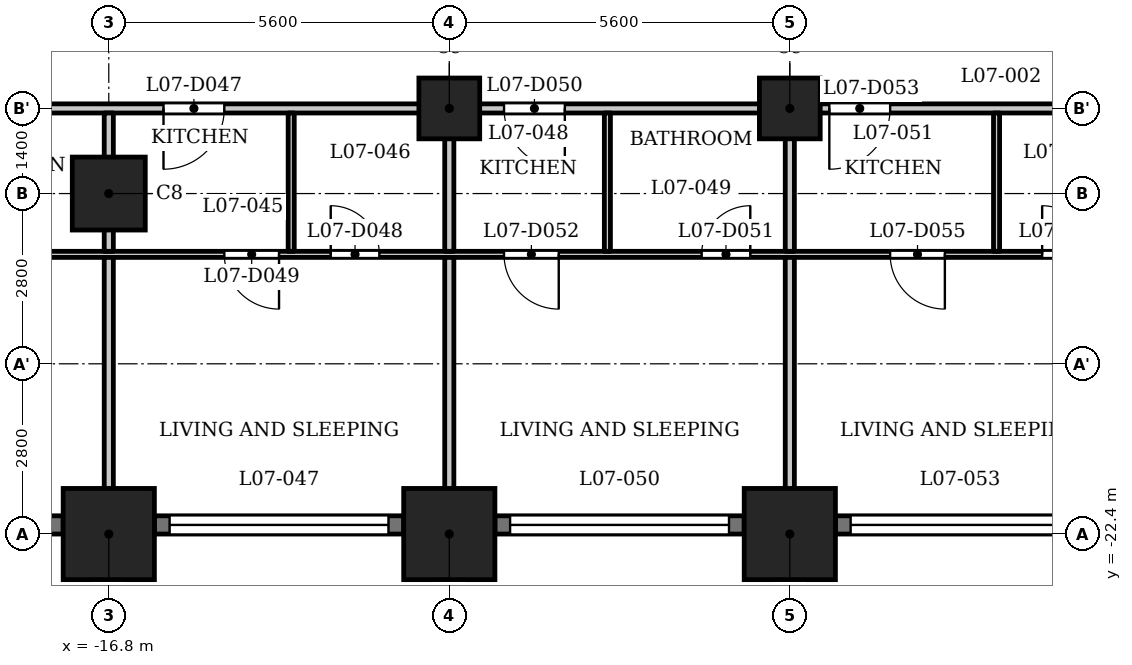
"""IFC4 building model, lengths in metres.
Left out: names, types, materials, properties, quantities, classifications, styles, units other than length and angle.
Written with IfcOpenShell. Run it as: python <this file> out.ifc"""

import sys

from ifc_helpers import new_model, si_unit, direction, frame, frame_2d, origin, origin_2d, place, context, subcontext, project, spatial, rectangle, extrude, element, fill, save


model = new_model("IFC4")
c1 = context("Model", 3, precision=1e-05, world=origin(), true_north=direction((0.0, 1.0)))
c2 = subcontext(c1, "Body", "Model", "MODEL_VIEW")
j1 = project(units=[si_unit("LENGTHUNIT", "METRE"), si_unit("PLANEANGLEUNIT", "RADIAN")], contexts=[c1])
p1 = place(None, origin())
s1 = spatial("IfcSite", under=j1, at=p1, CompositionType="ELEMENT")
p2 = place(p1, origin())
s2 = spatial("IfcBuilding", under=s1, at=p2, CompositionType="ELEMENT")
p3 = place(p2, frame((0.0, 0.0, 34.0)))
s3 = spatial("IfcBuildingStorey", under=s2, at=p3, CompositionType="ELEMENT", Elevation=34.0)
for number, where, z_axis, x_axis in (
    (1, (-16.8, -22.4, 0.0), (0.0, 0.0, 1.0), (1.0, 0.0, 0.0)),
    (2, (-11.2, -22.4, 0.0), (0.0, 0.0, 1.0), (1.0, 0.0, 0.0)),
    (3, (-5.6, -22.4, 0.0), (0.0, 0.0, 1.0), (1.0, 0.0, 0.0)),
):
    element("IfcColumn", number, at=place(p3, frame(where, z_axis=z_axis, x_axis=x_axis)), inside=s3, PredefinedType="COLUMN", context=c2, shape_type="SweptSolid", body=[
        extrude(rectangle(XDim=1.5, YDim=1.5, at=origin_2d()), origin(), (0.0, 0.0, 1.0), 3.5),
    ])
p4 = place(p3, frame((-16.8, -16.8, 0.0), z_axis=(0.0, 0.0, 1.0), x_axis=(1.0, 0.0, 0.0)))
e4 = element("IfcColumn", 4, at=p4, inside=s3, PredefinedType="COLUMN", context=c2, shape_type="SweptSolid", body=[
    extrude(rectangle(XDim=1.2, YDim=1.2, at=origin_2d()), origin(), (0.0, 0.0, 1.0), 3.5),
])
for number, where, z_axis, x_axis in (
    (5, (-11.2, -15.4, 0.0), (0.0, 0.0, 1.0), (1.0, 0.0, 0.0)),
    (6, (-5.6, -15.4, 0.0), (0.0, 0.0, 1.0), (1.0, 0.0, 0.0)),
):
    element("IfcColumn", number, at=place(p3, frame(where, z_axis=z_axis, x_axis=x_axis)), inside=s3, PredefinedType="COLUMN", context=c2, shape_type="SweptSolid", body=[
        extrude(rectangle(XDim=1.0, YDim=1.0, at=origin_2d()), origin(), (0.0, 0.0, 1.0), 3.5),
    ])
p5 = place(p3, frame((-20.0, -22.25, 0.0), z_axis=(0.0, 0.0, 1.0), x_axis=(1.0, 0.0, 0.0)))
e7 = element("IfcWall", 7, at=p5, inside=s3, PredefinedType="SOLIDWALL", context=c2, shape_type="SweptSolid", body=[
    extrude(rectangle(XDim=2.45, YDim=0.3, at=frame_2d((1.225, 0.0))), origin(), (0.0, 0.0, 1.0), 2.35),
])
p6 = place(p5, frame((0.625, 0.0, 0.6)))
e8 = element("IfcOpeningElement", 8, at=p6, cuts=e7, PredefinedType="OPENING", context=c2, shape_type="SweptSolid", body=[
    extrude(rectangle(XDim=1.2, YDim=1.55, at=frame_2d((0.6, 0.775))), frame((0.0, 0.16, 0.0), z_axis=(0.0, -1.0, 0.0), x_axis=(1.0, 0.0, 0.0)), (0.0, 0.0, 1.0), 0.32),
])
p7 = place(p3, frame((-16.05, -22.25, 0.0), z_axis=(0.0, 0.0, 1.0), x_axis=(1.0, 0.0, 0.0)))
e9 = element("IfcWall", 9, at=p7, inside=s3, PredefinedType="SOLIDWALL", context=c2, shape_type="SweptSolid", body=[
    extrude(rectangle(XDim=4.1, YDim=0.3, at=frame_2d((2.05, 0.0))), origin(), (0.0, 0.0, 1.0), 2.35),
])
p8 = place(p7, frame((0.25, 0.0, 1.2)))
e10 = element("IfcOpeningElement", 10, at=p8, cuts=e9, PredefinedType="OPENING", context=c2, shape_type="SweptSolid", body=[
    extrude(rectangle(XDim=3.6, YDim=0.95, at=frame_2d((1.8, 0.475))), frame((0.0, 0.16, 0.0), z_axis=(0.0, -1.0, 0.0), x_axis=(1.0, 0.0, 0.0)), (0.0, 0.0, 1.0), 0.32),
])
p9 = place(p3, frame((-10.45, -22.25, 0.0), z_axis=(0.0, 0.0, 1.0), x_axis=(1.0, 0.0, 0.0)))
e11 = element("IfcWall", 11, at=p9, inside=s3, PredefinedType="SOLIDWALL", context=c2, shape_type="SweptSolid", body=[
    extrude(rectangle(XDim=4.1, YDim=0.3, at=frame_2d((2.05, 0.0))), origin(), (0.0, 0.0, 1.0), 2.35),
])
p10 = place(p9, frame((0.25, 0.0, 1.2)))
e12 = element("IfcOpeningElement", 12, at=p10, cuts=e11, PredefinedType="OPENING", context=c2, shape_type="SweptSolid", body=[
    extrude(rectangle(XDim=3.6, YDim=0.95, at=frame_2d((1.8, 0.475))), frame((0.0, 0.16, 0.0), z_axis=(0.0, -1.0, 0.0), x_axis=(1.0, 0.0, 0.0)), (0.0, 0.0, 1.0), 0.32),
])
p11 = place(p3, frame((-4.85, -22.25, 0.0), z_axis=(0.0, 0.0, 1.0), x_axis=(1.0, 0.0, 0.0)))
e13 = element("IfcWall", 13, at=p11, inside=s3, PredefinedType="SOLIDWALL", context=c2, shape_type="SweptSolid", body=[
    extrude(rectangle(XDim=4.1, YDim=0.3, at=frame_2d((2.05, 0.0))), origin(), (0.0, 0.0, 1.0), 2.35),
])
p12 = place(p11, frame((0.25, 0.0, 1.2)))
e14 = element("IfcOpeningElement", 14, at=p12, cuts=e13, PredefinedType="OPENING", context=c2, shape_type="SweptSolid", body=[
    extrude(rectangle(XDim=3.6, YDim=0.95, at=frame_2d((1.8, 0.475))), frame((0.0, 0.16, 0.0), z_axis=(0.0, -1.0, 0.0), x_axis=(1.0, 0.0, 0.0)), (0.0, 0.0, 1.0), 0.32),
])
p13 = place(p3, frame((-26.394, -17.8, 0.0), z_axis=(0.0, 0.0, 1.0), x_axis=(1.0, 0.0, 0.0)))
e15 = element("IfcWall", 15, at=p13, inside=s3, PredefinedType="PARTITIONING", context=c2, shape_type="SweptSolid", body=[
    extrude(rectangle(XDim=53.126, YDim=0.1, at=frame_2d((26.563, 0.0))), origin(), (0.0, 0.0, 1.0), 3.2),
])
p14 = place(p13, frame((0.794, 0.0, 0.0)))
e16 = element("IfcOpeningElement", 16, at=p14, cuts=e15, PredefinedType="OPENING", context=c2, shape_type="SweptSolid", body=[
    extrude(rectangle(XDim=0.8, YDim=2.1, at=frame_2d((0.4, 1.05))), frame((0.0, 0.06, 0.0), z_axis=(0.0, -1.0, 0.0), x_axis=(1.0, 0.0, 0.0)), (0.0, 0.0, 1.0), 0.12),
])
p15 = place(p13, frame((5.644, 0.0, 0.0)))
e17 = element("IfcOpeningElement", 17, at=p15, cuts=e15, PredefinedType="OPENING", context=c2, shape_type="SweptSolid", body=[
    extrude(rectangle(XDim=0.9, YDim=2.1, at=frame_2d((0.45, 1.05))), frame((0.0, 0.06, 0.0), z_axis=(0.0, -1.0, 0.0), x_axis=(1.0, 0.0, 0.0)), (0.0, 0.0, 1.0), 0.12),
])
p16 = place(p13, frame((13.244, 0.0, 0.0)))
e18 = element("IfcOpeningElement", 18, at=p16, cuts=e15, PredefinedType="OPENING", context=c2, shape_type="SweptSolid", body=[
    extrude(rectangle(XDim=0.8, YDim=2.1, at=frame_2d((0.4, 1.05))), frame((0.0, 0.06, 0.0), z_axis=(0.0, -1.0, 0.0), x_axis=(1.0, 0.0, 0.0)), (0.0, 0.0, 1.0), 0.12),
])
p17 = place(p13, frame((11.494, 0.0, 0.0)))
e19 = element("IfcOpeningElement", 19, at=p17, cuts=e15, PredefinedType="OPENING", context=c2, shape_type="SweptSolid", body=[
    extrude(rectangle(XDim=0.9, YDim=2.1, at=frame_2d((0.45, 1.05))), frame((0.0, 0.06, 0.0), z_axis=(0.0, -1.0, 0.0), x_axis=(1.0, 0.0, 0.0)), (0.0, 0.0, 1.0), 0.12),
])
p18 = place(p13, frame((19.344, 0.0, 0.0)))
e20 = element("IfcOpeningElement", 20, at=p18, cuts=e15, PredefinedType="OPENING", context=c2, shape_type="SweptSolid", body=[
    extrude(rectangle(XDim=0.8, YDim=2.1, at=frame_2d((0.4, 1.05))), frame((0.0, 0.06, 0.0), z_axis=(0.0, -1.0, 0.0), x_axis=(1.0, 0.0, 0.0)), (0.0, 0.0, 1.0), 0.12),
])
p19 = place(p13, frame((16.094, 0.0, 0.0)))
e21 = element("IfcOpeningElement", 21, at=p19, cuts=e15, PredefinedType="OPENING", context=c2, shape_type="SweptSolid", body=[
    extrude(rectangle(XDim=0.9, YDim=2.1, at=frame_2d((0.45, 1.05))), frame((0.0, 0.06, 0.0), z_axis=(0.0, -1.0, 0.0), x_axis=(1.0, 0.0, 0.0)), (0.0, 0.0, 1.0), 0.12),
])
p20 = place(p13, frame((24.944, 0.0, 0.0)))
e22 = element("IfcOpeningElement", 22, at=p20, cuts=e15, PredefinedType="OPENING", context=c2, shape_type="SweptSolid", body=[
    extrude(rectangle(XDim=0.8, YDim=2.1, at=frame_2d((0.4, 1.05))), frame((0.0, 0.06, 0.0), z_axis=(0.0, -1.0, 0.0), x_axis=(1.0, 0.0, 0.0)), (0.0, 0.0, 1.0), 0.12),
])
p21 = place(p13, frame((22.444, 0.0, 0.0)))
e23 = element("IfcOpeningElement", 23, at=p21, cuts=e15, PredefinedType="OPENING", context=c2, shape_type="SweptSolid", body=[
    extrude(rectangle(XDim=0.9, YDim=2.1, at=frame_2d((0.45, 1.05))), frame((0.0, 0.06, 0.0), z_axis=(0.0, -1.0, 0.0), x_axis=(1.0, 0.0, 0.0)), (0.0, 0.0, 1.0), 0.12),
])
p22 = place(p13, frame((30.294, 0.0, 0.0)))
e24 = element("IfcOpeningElement", 24, at=p22, cuts=e15, PredefinedType="OPENING", context=c2, shape_type="SweptSolid", body=[
    extrude(rectangle(XDim=0.8, YDim=2.1, at=frame_2d((0.4, 1.05))), frame((0.0, 0.06, 0.0), z_axis=(0.0, -1.0, 0.0), x_axis=(1.0, 0.0, 0.0)), (0.0, 0.0, 1.0), 0.12),
])
p23 = place(p13, frame((26.794, 0.0, 0.0)))
e25 = element("IfcOpeningElement", 25, at=p23, cuts=e15, PredefinedType="OPENING", context=c2, shape_type="SweptSolid", body=[
    extrude(rectangle(XDim=0.9, YDim=2.1, at=frame_2d((0.45, 1.05))), frame((0.0, 0.06, 0.0), z_axis=(0.0, -1.0, 0.0), x_axis=(1.0, 0.0, 0.0)), (0.0, 0.0, 1.0), 0.12),
])
p24 = place(p13, frame((32.744, 0.0, 0.0)))
e26 = element("IfcOpeningElement", 26, at=p24, cuts=e15, PredefinedType="OPENING", context=c2, shape_type="SweptSolid", body=[
    extrude(rectangle(XDim=0.8, YDim=2.1, at=frame_2d((0.4, 1.05))), frame((0.0, 0.06, 0.0), z_axis=(0.0, -1.0, 0.0), x_axis=(1.0, 0.0, 0.0)), (0.0, 0.0, 1.0), 0.12),
])
p25 = place(p13, frame((35.594, 0.0, 0.0)))
e27 = element("IfcOpeningElement", 27, at=p25, cuts=e15, PredefinedType="OPENING", context=c2, shape_type="SweptSolid", body=[
    extrude(rectangle(XDim=0.9, YDim=2.1, at=frame_2d((0.45, 1.05))), frame((0.0, 0.06, 0.0), z_axis=(0.0, -1.0, 0.0), x_axis=(1.0, 0.0, 0.0)), (0.0, 0.0, 1.0), 0.12),
])
p26 = place(p13, frame((39.244, 0.0, 0.0)))
e28 = element("IfcOpeningElement", 28, at=p26, cuts=e15, PredefinedType="OPENING", context=c2, shape_type="SweptSolid", body=[
    extrude(rectangle(XDim=0.9, YDim=2.1, at=frame_2d((0.45, 1.05))), frame((0.0, 0.06, 0.0), z_axis=(0.0, -1.0, 0.0), x_axis=(1.0, 0.0, 0.0)), (0.0, 0.0, 1.0), 0.12),
])
p27 = place(p13, frame((41.544, 0.0, 0.0)))
e29 = element("IfcOpeningElement", 29, at=p27, cuts=e15, PredefinedType="OPENING", context=c2, shape_type="SweptSolid", body=[
    extrude(rectangle(XDim=0.9, YDim=2.1, at=frame_2d((0.45, 1.05))), frame((0.0, 0.06, 0.0), z_axis=(0.0, -1.0, 0.0), x_axis=(1.0, 0.0, 0.0)), (0.0, 0.0, 1.0), 0.12),
])
p28 = place(p13, frame((49.362, 0.0, 0.0)))
e30 = element("IfcOpeningElement", 30, at=p28, cuts=e15, PredefinedType="OPENING", context=c2, shape_type="SweptSolid", body=[
    extrude(rectangle(XDim=0.8, YDim=2.1, at=frame_2d((0.4, 1.05))), frame((0.0, 0.06, 0.0), z_axis=(0.0, -1.0, 0.0), x_axis=(1.0, 0.0, 0.0)), (0.0, 0.0, 1.0), 0.12),
])
p29 = place(p13, frame((45.094, 0.0, 0.0)))
e31 = element("IfcOpeningElement", 31, at=p29, cuts=e15, PredefinedType="OPENING", context=c2, shape_type="SweptSolid", body=[
    extrude(rectangle(XDim=0.9, YDim=2.1, at=frame_2d((0.45, 1.05))), frame((0.0, 0.06, 0.0), z_axis=(0.0, -1.0, 0.0), x_axis=(1.0, 0.0, 0.0)), (0.0, 0.0, 1.0), 0.12),
])
p30 = place(p3, frame((-27.484, -15.4, 0.0), z_axis=(0.0, 0.0, 1.0), x_axis=(1.0, 0.0, 0.0)))
e32 = element("IfcWall", 32, at=p30, inside=s3, PredefinedType="PARTITIONING", context=c2, shape_type="SweptSolid", body=[
    extrude(rectangle(XDim=54.968, YDim=0.15, at=frame_2d((27.484, 0.0))), origin(), (0.0, 0.0, 1.0), 3.2),
])
p31 = place(p30, frame((5.734, 0.0, 0.0)))
e33 = element("IfcOpeningElement", 33, at=p31, cuts=e32, PredefinedType="OPENING", context=c2, shape_type="SweptSolid", body=[
    extrude(rectangle(XDim=1.0, YDim=2.1, at=frame_2d((0.5, 1.05))), frame((0.0, 0.085, 0.0), z_axis=(0.0, -1.0, 0.0), x_axis=(1.0, 0.0, 0.0)), (0.0, 0.0, 1.0), 0.17),
])
p32 = place(p30, frame((11.584, 0.0, 0.0)))
e34 = element("IfcOpeningElement", 34, at=p32, cuts=e32, PredefinedType="OPENING", context=c2, shape_type="SweptSolid", body=[
    extrude(rectangle(XDim=1.0, YDim=2.1, at=frame_2d((0.5, 1.05))), frame((0.0, 0.085, 0.0), z_axis=(0.0, -1.0, 0.0), x_axis=(1.0, 0.0, 0.0)), (0.0, 0.0, 1.0), 0.17),
])
p33 = place(p30, frame((17.184, 0.0, 0.0)))
e35 = element("IfcOpeningElement", 35, at=p33, cuts=e32, PredefinedType="OPENING", context=c2, shape_type="SweptSolid", body=[
    extrude(rectangle(XDim=1.0, YDim=2.1, at=frame_2d((0.5, 1.05))), frame((0.0, 0.085, 0.0), z_axis=(0.0, -1.0, 0.0), x_axis=(1.0, 0.0, 0.0)), (0.0, 0.0, 1.0), 0.17),
])
p34 = place(p30, frame((22.534, 0.0, 0.0)))
e36 = element("IfcOpeningElement", 36, at=p34, cuts=e32, PredefinedType="OPENING", context=c2, shape_type="SweptSolid", body=[
    extrude(rectangle(XDim=1.0, YDim=2.1, at=frame_2d((0.5, 1.05))), frame((0.0, 0.085, 0.0), z_axis=(0.0, -1.0, 0.0), x_axis=(1.0, 0.0, 0.0)), (0.0, 0.0, 1.0), 0.17),
])
p35 = place(p30, frame((28.884, 0.0, 0.0)))
e37 = element("IfcOpeningElement", 37, at=p35, cuts=e32, PredefinedType="OPENING", context=c2, shape_type="SweptSolid", body=[
    extrude(rectangle(XDim=1.0, YDim=2.1, at=frame_2d((0.5, 1.05))), frame((0.0, 0.085, 0.0), z_axis=(0.0, -1.0, 0.0), x_axis=(1.0, 0.0, 0.0)), (0.0, 0.0, 1.0), 0.17),
])
p36 = place(p30, frame((39.334, 0.0, 0.0)))
e38 = element("IfcOpeningElement", 38, at=p36, cuts=e32, PredefinedType="OPENING", context=c2, shape_type="SweptSolid", body=[
    extrude(rectangle(XDim=1.0, YDim=2.1, at=frame_2d((0.5, 1.05))), frame((0.0, 0.085, 0.0), z_axis=(0.0, -1.0, 0.0), x_axis=(1.0, 0.0, 0.0)), (0.0, 0.0, 1.0), 0.17),
])
p37 = place(p30, frame((45.184, 0.0, 0.0)))
e39 = element("IfcOpeningElement", 39, at=p37, cuts=e32, PredefinedType="OPENING", context=c2, shape_type="SweptSolid", body=[
    extrude(rectangle(XDim=1.0, YDim=2.1, at=frame_2d((0.5, 1.05))), frame((0.0, 0.085, 0.0), z_axis=(0.0, -1.0, 0.0), x_axis=(1.0, 0.0, 0.0)), (0.0, 0.0, 1.0), 0.17),
])
p38 = place(p3, frame((-16.8, -23.13, 0.0), z_axis=(0.0, 0.0, 1.0), x_axis=(0.0, 1.0, 0.0)))
e40 = element("IfcWall", 40, at=p38, inside=s3, PredefinedType="PARTITIONING", context=c2, shape_type="SweptSolid", body=[
    extrude(rectangle(XDim=5.28, YDim=0.15, at=frame_2d((2.64, 0.0))), origin(), (0.0, 0.0, 1.0), 3.2),
])
p39 = place(p3, frame((-16.8, -17.75, 0.0), z_axis=(0.0, 0.0, 1.0), x_axis=(0.0, 1.0, 0.0)))
e41 = element("IfcWall", 41, at=p39, inside=s3, PredefinedType="PARTITIONING", context=c2, shape_type="SweptSolid", body=[
    extrude(rectangle(XDim=2.275, YDim=0.15, at=frame_2d((1.137, 0.0))), origin(), (0.0, 0.0, 1.0), 3.2),
])
p40 = place(p3, frame((-13.8, -17.75, 0.0), z_axis=(0.0, 0.0, 1.0), x_axis=(0.0, 1.0, 0.0)))
e42 = element("IfcWall", 42, at=p40, inside=s3, PredefinedType="PARTITIONING", context=c2, shape_type="SweptSolid", body=[
    extrude(rectangle(XDim=2.275, YDim=0.1, at=frame_2d((1.137, 0.0))), origin(), (0.0, 0.0, 1.0), 3.2),
])
p41 = place(p3, frame((-11.2, -23.13, 0.0), z_axis=(0.0, 0.0, 1.0), x_axis=(0.0, 1.0, 0.0)))
e43 = element("IfcWall", 43, at=p41, inside=s3, PredefinedType="PARTITIONING", context=c2, shape_type="SweptSolid", body=[
    extrude(rectangle(XDim=5.28, YDim=0.15, at=frame_2d((2.64, 0.0))), origin(), (0.0, 0.0, 1.0), 3.2),
])
p42 = place(p3, frame((-11.2, -17.75, 0.0), z_axis=(0.0, 0.0, 1.0), x_axis=(0.0, 1.0, 0.0)))
e44 = element("IfcWall", 44, at=p42, inside=s3, PredefinedType="PARTITIONING", context=c2, shape_type="SweptSolid", body=[
    extrude(rectangle(XDim=2.275, YDim=0.15, at=frame_2d((1.137, 0.0))), origin(), (0.0, 0.0, 1.0), 3.2),
])
p43 = place(p3, frame((-8.6, -17.75, 0.0), z_axis=(0.0, 0.0, 1.0), x_axis=(0.0, 1.0, 0.0)))
e45 = element("IfcWall", 45, at=p43, inside=s3, PredefinedType="PARTITIONING", context=c2, shape_type="SweptSolid", body=[
    extrude(rectangle(XDim=2.275, YDim=0.1, at=frame_2d((1.137, 0.0))), origin(), (0.0, 0.0, 1.0), 3.2),
])
p44 = place(p3, frame((-5.6, -23.13, 0.0), z_axis=(0.0, 0.0, 1.0), x_axis=(0.0, 1.0, 0.0)))
e46 = element("IfcWall", 46, at=p44, inside=s3, PredefinedType="PARTITIONING", context=c2, shape_type="SweptSolid", body=[
    extrude(rectangle(XDim=5.28, YDim=0.15, at=frame_2d((2.64, 0.0))), origin(), (0.0, 0.0, 1.0), 3.2),
])
p45 = place(p3, frame((-5.6, -17.75, 0.0), z_axis=(0.0, 0.0, 1.0), x_axis=(0.0, 1.0, 0.0)))
e47 = element("IfcWall", 47, at=p45, inside=s3, PredefinedType="PARTITIONING", context=c2, shape_type="SweptSolid", body=[
    extrude(rectangle(XDim=2.275, YDim=0.15, at=frame_2d((1.137, 0.0))), origin(), (0.0, 0.0, 1.0), 3.2),
])
p46 = place(p3, frame((-2.2, -17.75, 0.0), z_axis=(0.0, 0.0, 1.0), x_axis=(0.0, 1.0, 0.0)))
e48 = element("IfcWall", 48, at=p46, inside=s3, PredefinedType="PARTITIONING", context=c2, shape_type="SweptSolid", body=[
    extrude(rectangle(XDim=2.275, YDim=0.1, at=frame_2d((1.137, 0.0))), origin(), (0.0, 0.0, 1.0), 3.2),
])
p47 = place(p32, origin())
e49 = element("IfcDoor", 49, at=p47, inside=s3, OperationType="SINGLE_SWING_LEFT", PredefinedType="DOOR", context=c2, shape_type="SweptSolid", body=[
    extrude(rectangle(XDim=1.0, YDim=2.1, at=frame_2d((0.5, 1.05))), frame((0.0, 0.025, 0.0), z_axis=(0.0, -1.0, 0.0), x_axis=(1.0, 0.0, 0.0)), (0.0, 0.0, 1.0), 0.05),
])
fill(e34, e49)
p48 = place(p16, origin())
e50 = element("IfcDoor", 50, at=p48, inside=s3, OperationType="SINGLE_SWING_RIGHT", PredefinedType="DOOR", context=c2, shape_type="SweptSolid", body=[
    extrude(rectangle(XDim=0.8, YDim=2.1, at=frame_2d((0.4, 1.05))), frame((0.0, 0.025, 0.0), z_axis=(0.0, -1.0, 0.0), x_axis=(1.0, 0.0, 0.0)), (0.0, 0.0, 1.0), 0.05),
])
fill(e18, e50)
p49 = place(p17, origin())
e51 = element("IfcDoor", 51, at=p49, inside=s3, OperationType="SINGLE_SWING_RIGHT", PredefinedType="DOOR", context=c2, shape_type="SweptSolid", body=[
    extrude(rectangle(XDim=0.9, YDim=2.1, at=frame_2d((0.45, 1.05))), frame((0.0, 0.025, 0.0), z_axis=(0.0, -1.0, 0.0), x_axis=(1.0, 0.0, 0.0)), (0.0, 0.0, 1.0), 0.05),
])
fill(e19, e51)
p50 = place(p33, origin())
e52 = element("IfcDoor", 52, at=p50, inside=s3, OperationType="SINGLE_SWING_RIGHT", PredefinedType="DOOR", context=c2, shape_type="SweptSolid", body=[
    extrude(rectangle(XDim=1.0, YDim=2.1, at=frame_2d((0.5, 1.05))), frame((0.0, 0.025, 0.0), z_axis=(0.0, -1.0, 0.0), x_axis=(1.0, 0.0, 0.0)), (0.0, 0.0, 1.0), 0.05),
])
fill(e35, e52)
p51 = place(p18, origin())
e53 = element("IfcDoor", 53, at=p51, inside=s3, OperationType="SINGLE_SWING_LEFT", PredefinedType="DOOR", context=c2, shape_type="SweptSolid", body=[
    extrude(rectangle(XDim=0.8, YDim=2.1, at=frame_2d((0.4, 1.05))), frame((0.0, 0.025, 0.0), z_axis=(0.0, -1.0, 0.0), x_axis=(1.0, 0.0, 0.0)), (0.0, 0.0, 1.0), 0.05),
])
fill(e20, e53)
p52 = place(p19, origin())
e54 = element("IfcDoor", 54, at=p52, inside=s3, OperationType="SINGLE_SWING_RIGHT", PredefinedType="DOOR", context=c2, shape_type="SweptSolid", body=[
    extrude(rectangle(XDim=0.9, YDim=2.1, at=frame_2d((0.45, 1.05))), frame((0.0, 0.025, 0.0), z_axis=(0.0, -1.0, 0.0), x_axis=(1.0, 0.0, 0.0)), (0.0, 0.0, 1.0), 0.05),
])
fill(e21, e54)
p53 = place(p34, origin())
e55 = element("IfcDoor", 55, at=p53, inside=s3, OperationType="SINGLE_SWING_LEFT", PredefinedType="DOOR", context=c2, shape_type="SweptSolid", body=[
    extrude(rectangle(XDim=1.0, YDim=2.1, at=frame_2d((0.5, 1.05))), frame((0.0, 0.025, 0.0), z_axis=(0.0, -1.0, 0.0), x_axis=(1.0, 0.0, 0.0)), (0.0, 0.0, 1.0), 0.05),
])
fill(e36, e55)
p54 = place(p20, origin())
e56 = element("IfcDoor", 56, at=p54, inside=s3, OperationType="SINGLE_SWING_RIGHT", PredefinedType="DOOR", context=c2, shape_type="SweptSolid", body=[
    extrude(rectangle(XDim=0.8, YDim=2.1, at=frame_2d((0.4, 1.05))), frame((0.0, 0.025, 0.0), z_axis=(0.0, -1.0, 0.0), x_axis=(1.0, 0.0, 0.0)), (0.0, 0.0, 1.0), 0.05),
])
fill(e22, e56)
p55 = place(p21, origin())
e57 = element("IfcDoor", 57, at=p55, inside=s3, OperationType="SINGLE_SWING_RIGHT", PredefinedType="DOOR", context=c2, shape_type="SweptSolid", body=[
    extrude(rectangle(XDim=0.9, YDim=2.1, at=frame_2d((0.45, 1.05))), frame((0.0, 0.025, 0.0), z_axis=(0.0, -1.0, 0.0), x_axis=(1.0, 0.0, 0.0)), (0.0, 0.0, 1.0), 0.05),
])
fill(e23, e57)
p56 = place(p8, origin())
e58 = element("IfcWindow", 58, at=p56, inside=s3, PartitioningType="SINGLE_PANEL", PredefinedType="WINDOW", context=c2, shape_type="SweptSolid", body=[
    extrude(rectangle(XDim=3.6, YDim=0.95, at=frame_2d((1.8, 0.475))), frame((0.0, 0.03, 0.0), z_axis=(0.0, -1.0, 0.0), x_axis=(1.0, 0.0, 0.0)), (0.0, 0.0, 1.0), 0.06),
])
fill(e10, e58)
p57 = place(p10, origin())
e59 = element("IfcWindow", 59, at=p57, inside=s3, PartitioningType="SINGLE_PANEL", PredefinedType="WINDOW", context=c2, shape_type="SweptSolid", body=[
    extrude(rectangle(XDim=3.6, YDim=0.95, at=frame_2d((1.8, 0.475))), frame((0.0, 0.03, 0.0), z_axis=(0.0, -1.0, 0.0), x_axis=(1.0, 0.0, 0.0)), (0.0, 0.0, 1.0), 0.06),
])
fill(e12, e59)
p58 = place(p12, origin())
e60 = element("IfcWindow", 60, at=p58, inside=s3, PartitioningType="SINGLE_PANEL", PredefinedType="WINDOW", context=c2, shape_type="SweptSolid", body=[
    extrude(rectangle(XDim=3.6, YDim=0.95, at=frame_2d((1.8, 0.475))), frame((0.0, 0.03, 0.0), z_axis=(0.0, -1.0, 0.0), x_axis=(1.0, 0.0, 0.0)), (0.0, 0.0, 1.0), 0.06),
])
fill(e14, e60)
save(model, sys.argv[1])
